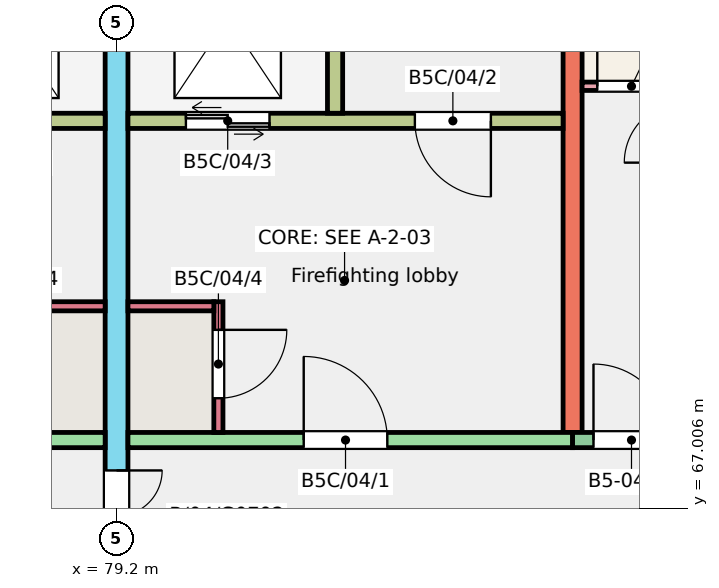
"""IFC4 building model, lengths in metres.
Left out: names, types, materials, properties, quantities, classifications, styles, units other than length and angle.
Written with IfcOpenShell. Run it as: python <this file> out.ifc"""

import sys

from ifc_helpers import new_model, si_unit, direction, frame, frame_2d, origin, place, context, subcontext, project, spatial, rectangle, extrude, element, fill, save


model = new_model("IFC4")
c1 = context("Model", 3, precision=1e-05, world=origin(), true_north=direction((0.0, 1.0)))
c2 = subcontext(c1, "Body", "Model", "MODEL_VIEW")
j1 = project(units=[si_unit("LENGTHUNIT", "METRE"), si_unit("PLANEANGLEUNIT", "RADIAN")], contexts=[c1])
p1 = place(None, origin())
s1 = spatial("IfcSite", under=j1, at=p1, CompositionType="ELEMENT")
p2 = place(p1, origin())
s2 = spatial("IfcBuilding", under=s1, at=p2, CompositionType="ELEMENT")
p3 = place(p2, frame((0.0, 0.0, 12.0)))
s3 = spatial("IfcBuildingStorey", under=s2, at=p3, CompositionType="ELEMENT", Elevation=12.0)
p4 = place(p3, frame((79.2, 66.0, 0.0), z_axis=(0.0, 0.0, 1.0), x_axis=(0.0, 1.0, 0.0)))
e1 = element("IfcWall", 1, at=p4, inside=s3, PredefinedType="SHEAR", context=c2, shape_type="SweptSolid", body=[
    extrude(rectangle(XDim=11.0, YDim=0.3, at=frame_2d((5.5, 0.0))), origin(), (0.0, 0.0, 1.0), 3.0),
])
p5 = place(p4, frame((0.3, 0.0, 0.0)))
e2 = element("IfcOpeningElement", 2, at=p5, cuts=e1, PredefinedType="OPENING", context=c2, shape_type="SweptSolid", body=[
    extrude(rectangle(XDim=1.2, YDim=2.1, at=frame_2d((0.6, 1.05))), frame((0.0, 0.16, 0.0), z_axis=(0.0, -1.0, 0.0), x_axis=(1.0, 0.0, 0.0)), (0.0, 0.0, 1.0), 0.32),
])
p6 = place(p3, frame((85.2, 68.0, 0.0), z_axis=(0.0, 0.0, 1.0), x_axis=(0.0, 1.0, 0.0)))
e3 = element("IfcWall", 3, at=p6, inside=s3, PredefinedType="SHEAR", context=c2, shape_type="SweptSolid", body=[
    extrude(rectangle(XDim=9.0, YDim=0.25, at=frame_2d((4.5, 0.0))), origin(), (0.0, 0.0, 1.0), 3.0),
])
p7 = place(p3, frame((73.2, 67.9, 0.0), z_axis=(0.0, 0.0, 1.0), x_axis=(1.0, 0.0, 0.0)))
e4 = element("IfcWall", 4, at=p7, inside=s3, PredefinedType="SHEAR", context=c2, shape_type="SweptSolid", body=[
    extrude(rectangle(XDim=5.85, YDim=0.2, at=frame_2d((2.925, 0.0))), origin(), (0.0, 0.0, 1.0), 3.0),
])
p8 = place(p7, frame((2.438, 0.0, 0.0)))
e5 = element("IfcOpeningElement", 5, at=p8, cuts=e4, PredefinedType="OPENING", context=c2, shape_type="SweptSolid", body=[
    extrude(rectangle(XDim=1.1, YDim=2.1, at=frame_2d((0.55, 1.05))), frame((0.0, 0.11, 0.0), z_axis=(0.0, -1.0, 0.0), x_axis=(1.0, 0.0, 0.0)), (0.0, 0.0, 1.0), 0.22),
])
p9 = place(p3, frame((73.325, 72.1, 0.0), z_axis=(0.0, 0.0, 1.0), x_axis=(1.0, 0.0, 0.0)))
e6 = element("IfcWall", 6, at=p9, inside=s3, PredefinedType="SHEAR", context=c2, shape_type="SweptSolid", body=[
    extrude(rectangle(XDim=5.725, YDim=0.2, at=frame_2d((2.863, 0.0))), origin(), (0.0, 0.0, 1.0), 3.0),
])
p10 = place(p9, frame((0.95, 0.0, 0.0)))
e7 = element("IfcOpeningElement", 7, at=p10, cuts=e6, PredefinedType="OPENING", context=c2, shape_type="SweptSolid", body=[
    extrude(rectangle(XDim=1.0, YDim=2.1, at=frame_2d((0.5, 1.05))), frame((0.0, 0.11, 0.0), z_axis=(0.0, -1.0, 0.0), x_axis=(1.0, 0.0, 0.0)), (0.0, 0.0, 1.0), 0.22),
])
p11 = place(p9, frame((3.863, 0.0, 0.0)))
e8 = element("IfcOpeningElement", 8, at=p11, cuts=e6, PredefinedType="OPENING", context=c2, shape_type="SweptSolid", body=[
    extrude(rectangle(XDim=1.1, YDim=2.1, at=frame_2d((0.55, 1.05))), frame((0.0, 0.11, 0.0), z_axis=(0.0, -1.0, 0.0), x_axis=(1.0, 0.0, 0.0)), (0.0, 0.0, 1.0), 0.22),
])
p12 = place(p3, frame((77.92, 69.66, 0.0), z_axis=(0.0, 0.0, 1.0), x_axis=(1.0, 0.0, 0.0)))
e9 = element("IfcWall", 9, at=p12, inside=s3, PredefinedType="SHEAR", context=c2, shape_type="SweptSolid", body=[
    extrude(rectangle(XDim=1.13, YDim=0.12, at=frame_2d((0.565, 0.0))), origin(), (0.0, 0.0, 1.0), 3.0),
])
p13 = place(p3, frame((79.35, 67.9, 0.0), z_axis=(0.0, 0.0, 1.0), x_axis=(1.0, 0.0, 0.0)))
e10 = element("IfcWall", 10, at=p13, inside=s3, PredefinedType="SHEAR", context=c2, shape_type="SweptSolid", body=[
    extrude(rectangle(XDim=5.85, YDim=0.2, at=frame_2d((2.925, 0.0))), origin(), (0.0, 0.0, 1.0), 3.0),
])
p14 = place(p13, frame((2.312, 0.0, 0.0)))
e11 = element("IfcOpeningElement", 11, at=p14, cuts=e10, PredefinedType="OPENING", context=c2, shape_type="SweptSolid", body=[
    extrude(rectangle(XDim=1.1, YDim=2.1, at=frame_2d((0.55, 1.05))), frame((0.0, 0.11, 0.0), z_axis=(0.0, -1.0, 0.0), x_axis=(1.0, 0.0, 0.0)), (0.0, 0.0, 1.0), 0.22),
])
p15 = place(p3, frame((79.35, 72.1, 0.0), z_axis=(0.0, 0.0, 1.0), x_axis=(1.0, 0.0, 0.0)))
e12 = element("IfcWall", 12, at=p15, inside=s3, PredefinedType="SHEAR", context=c2, shape_type="SweptSolid", body=[
    extrude(rectangle(XDim=5.725, YDim=0.2, at=frame_2d((2.862, 0.0))), origin(), (0.0, 0.0, 1.0), 3.0),
])
p16 = place(p15, frame((3.775, 0.0, 0.0)))
e13 = element("IfcOpeningElement", 13, at=p16, cuts=e12, PredefinedType="OPENING", context=c2, shape_type="SweptSolid", body=[
    extrude(rectangle(XDim=1.0, YDim=2.1, at=frame_2d((0.5, 1.05))), frame((0.0, 0.11, 0.0), z_axis=(0.0, -1.0, 0.0), x_axis=(1.0, 0.0, 0.0)), (0.0, 0.0, 1.0), 0.22),
])
p17 = place(p15, frame((0.762, 0.0, 0.0)))
e14 = element("IfcOpeningElement", 14, at=p17, cuts=e12, PredefinedType="OPENING", context=c2, shape_type="SweptSolid", body=[
    extrude(rectangle(XDim=1.1, YDim=2.1, at=frame_2d((0.55, 1.05))), frame((0.0, 0.11, 0.0), z_axis=(0.0, -1.0, 0.0), x_axis=(1.0, 0.0, 0.0)), (0.0, 0.0, 1.0), 0.22),
])
p18 = place(p3, frame((82.075, 72.2, 0.0), z_axis=(0.0, 0.0, 1.0), x_axis=(0.0, 1.0, 0.0)))
e15 = element("IfcWall", 15, at=p18, inside=s3, PredefinedType="SHEAR", context=c2, shape_type="SweptSolid", body=[
    extrude(rectangle(XDim=4.8, YDim=0.2, at=frame_2d((2.4, 0.0))), origin(), (0.0, 0.0, 1.0), 3.0),
])
p19 = place(p3, frame((80.54, 68.0, 0.0), z_axis=(0.0, 0.0, 1.0), x_axis=(0.0, 1.0, 0.0)))
e16 = element("IfcWall", 16, at=p19, inside=s3, PredefinedType="SHEAR", context=c2, shape_type="SweptSolid", body=[
    extrude(rectangle(XDim=1.72, YDim=0.12, at=frame_2d((0.86, 0.0))), origin(), (0.0, 0.0, 1.0), 3.0),
])
p20 = place(p19, frame((0.45, 0.0, 0.0)))
e17 = element("IfcOpeningElement", 17, at=p20, cuts=e16, PredefinedType="OPENING", context=c2, shape_type="SweptSolid", body=[
    extrude(rectangle(XDim=0.9, YDim=2.1, at=frame_2d((0.45, 1.05))), frame((0.0, 0.07, 0.0), z_axis=(0.0, -1.0, 0.0), x_axis=(1.0, 0.0, 0.0)), (0.0, 0.0, 1.0), 0.14),
])
p21 = place(p3, frame((79.35, 69.66, 0.0), z_axis=(0.0, 0.0, 1.0), x_axis=(1.0, 0.0, 0.0)))
e18 = element("IfcWall", 18, at=p21, inside=s3, PredefinedType="SHEAR", context=c2, shape_type="SweptSolid", body=[
    extrude(rectangle(XDim=1.13, YDim=0.12, at=frame_2d((0.565, 0.0))), origin(), (0.0, 0.0, 1.0), 3.0),
])
p22 = place(p3, frame((85.2, 67.9, 0.0), z_axis=(0.0, 0.0, 1.0), x_axis=(1.0, 0.0, 0.0)))
e19 = element("IfcWall", 19, at=p22, inside=s3, PredefinedType="SOLIDWALL", context=c2, shape_type="SweptSolid", body=[
    extrude(rectangle(XDim=3.6, YDim=0.2, at=frame_2d((1.8, 0.0))), origin(), (0.0, 0.0, 1.0), 3.0),
])
p23 = place(p22, frame((1.917, 0.0, 1.1)))
e20 = element("IfcOpeningElement", 20, at=p23, cuts=e19, PredefinedType="OPENING", context=c2, shape_type="SweptSolid", body=[
    extrude(rectangle(XDim=1.2, YDim=1.3, at=frame_2d((0.6, 0.65))), frame((0.0, 0.11, 0.0), z_axis=(0.0, -1.0, 0.0), x_axis=(1.0, 0.0, 0.0)), (0.0, 0.0, 1.0), 0.22),
])
p24 = place(p22, frame((0.275, 0.0, 0.0)))
e21 = element("IfcOpeningElement", 21, at=p24, cuts=e19, PredefinedType="OPENING", context=c2, shape_type="SweptSolid", body=[
    extrude(rectangle(XDim=1.0, YDim=2.1, at=frame_2d((0.5, 1.05))), frame((0.0, 0.11, 0.0), z_axis=(0.0, -1.0, 0.0), x_axis=(1.0, 0.0, 0.0)), (0.0, 0.0, 1.0), 0.22),
])
p25 = place(p3, frame((85.325, 72.555, 0.0), z_axis=(0.0, 0.0, 1.0), x_axis=(1.0, 0.0, 0.0)))
e22 = element("IfcWall", 22, at=p25, inside=s3, PredefinedType="PARTITIONING", context=c2, shape_type="SweptSolid", body=[
    extrude(rectangle(XDim=3.375, YDim=0.11, at=frame_2d((1.688, 0.0))), origin(), (0.0, 0.0, 1.0), 2.8),
])
p26 = place(p25, frame((0.2, 0.0, 0.0)))
e23 = element("IfcOpeningElement", 23, at=p26, cuts=e22, PredefinedType="OPENING", context=c2, shape_type="SweptSolid", body=[
    extrude(rectangle(XDim=0.9, YDim=2.1, at=frame_2d((0.45, 1.05))), frame((0.0, 0.065, 0.0), z_axis=(0.0, -1.0, 0.0), x_axis=(1.0, 0.0, 0.0)), (0.0, 0.0, 1.0), 0.13),
])
p27 = place(p24, origin())
e24 = element("IfcDoor", 24, at=p27, inside=s3, OperationType="SINGLE_SWING_LEFT", PredefinedType="DOOR", context=c2, shape_type="SweptSolid", body=[
    extrude(rectangle(XDim=1.0, YDim=2.1, at=frame_2d((0.5, 1.05))), frame((0.0, 0.025, 0.0), z_axis=(0.0, -1.0, 0.0), x_axis=(1.0, 0.0, 0.0)), (0.0, 0.0, 1.0), 0.05),
])
fill(e21, e24)
p28 = place(p26, origin())
e25 = element("IfcDoor", 25, at=p28, inside=s3, OperationType="SINGLE_SWING_LEFT", PredefinedType="DOOR", context=c2, shape_type="SweptSolid", body=[
    extrude(rectangle(XDim=0.9, YDim=2.1, at=frame_2d((0.45, 1.05))), frame((0.0, 0.025, 0.0), z_axis=(0.0, -1.0, 0.0), x_axis=(1.0, 0.0, 0.0)), (0.0, 0.0, 1.0), 0.05),
])
fill(e23, e25)
p29 = place(p14, origin())
e26 = element("IfcDoor", 26, at=p29, inside=s3, OperationType="SINGLE_SWING_LEFT", PredefinedType="DOOR", context=c2, shape_type="SweptSolid", body=[
    extrude(rectangle(XDim=1.1, YDim=2.1, at=frame_2d((0.55, 1.05))), frame((0.0, 0.025, 0.0), z_axis=(0.0, -1.0, 0.0), x_axis=(1.0, 0.0, 0.0)), (0.0, 0.0, 1.0), 0.05),
])
fill(e11, e26)
p30 = place(p16, origin())
e27 = element("IfcDoor", 27, at=p30, inside=s3, OperationType="SINGLE_SWING_RIGHT", PredefinedType="DOOR", context=c2, shape_type="SweptSolid", body=[
    extrude(rectangle(XDim=1.0, YDim=2.1, at=frame_2d((0.5, 1.05))), frame((0.0, 0.025, 0.0), z_axis=(0.0, -1.0, 0.0), x_axis=(1.0, 0.0, 0.0)), (0.0, 0.0, 1.0), 0.05),
])
fill(e13, e27)
p31 = place(p17, origin())
e28 = element("IfcDoor", 28, at=p31, inside=s3, OperationType="DOUBLE_DOOR_SLIDING", PredefinedType="DOOR", context=c2, shape_type="SweptSolid", body=[
    extrude(rectangle(XDim=1.1, YDim=2.1, at=frame_2d((0.55, 1.05))), frame((0.0, 0.025, 0.0), z_axis=(0.0, -1.0, 0.0), x_axis=(1.0, 0.0, 0.0)), (0.0, 0.0, 1.0), 0.05),
])
fill(e14, e28)
p32 = place(p20, origin())
e29 = element("IfcDoor", 29, at=p32, inside=s3, OperationType="SINGLE_SWING_RIGHT", PredefinedType="DOOR", context=c2, shape_type="SweptSolid", body=[
    extrude(rectangle(XDim=0.9, YDim=2.1, at=frame_2d((0.45, 1.05))), frame((0.0, 0.025, 0.0), z_axis=(0.0, -1.0, 0.0), x_axis=(1.0, 0.0, 0.0)), (0.0, 0.0, 1.0), 0.05),
])
fill(e17, e29)
p33 = place(p5, origin())
e30 = element("IfcDoor", 30, at=p33, inside=s3, OperationType="DOUBLE_DOOR_SINGLE_SWING", PredefinedType="DOOR", context=c2, shape_type="SweptSolid", body=[
    extrude(rectangle(XDim=1.2, YDim=2.1, at=frame_2d((0.6, 1.05))), frame((0.0, 0.025, 0.0), z_axis=(0.0, -1.0, 0.0), x_axis=(1.0, 0.0, 0.0)), (0.0, 0.0, 1.0), 0.05),
])
fill(e2, e30)
save(model, sys.argv[1])
